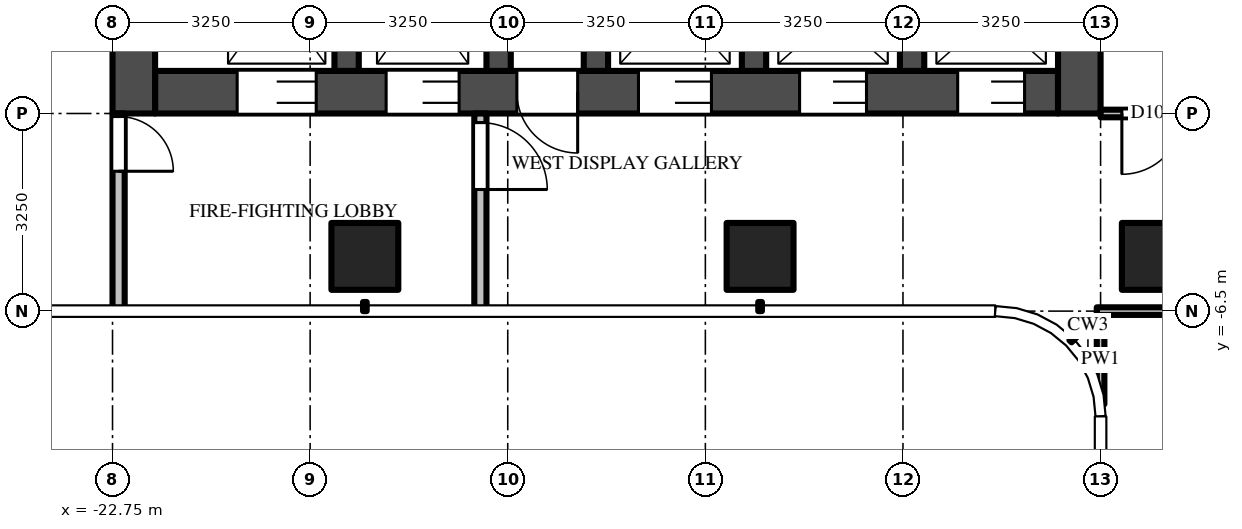
"""IFC4 building model, lengths in metres.
Left out: names, types, materials, properties, quantities, classifications, styles, units other than length and angle.
Written with IfcOpenShell. Run it as: python <this file> out.ifc"""

import sys

from ifc_helpers import new_model, si_unit, direction, frame, frame_2d, origin, origin_2d, place, context, subcontext, project, spatial, rectangle, extrude, source, transform, mapped, element, fill, save


model = new_model("IFC4")
c1 = context("Model", 3, precision=1e-05, world=origin(), true_north=direction((0.0, 1.0)))
c2 = subcontext(c1, "Body", "Model", "MODEL_VIEW")
j1 = project(units=[si_unit("LENGTHUNIT", "METRE"), si_unit("PLANEANGLEUNIT", "RADIAN")], contexts=[c1])
p1 = place(None, origin())
s1 = spatial("IfcSite", under=j1, at=p1, CompositionType="ELEMENT")
p2 = place(p1, origin())
s2 = spatial("IfcBuilding", under=s1, at=p2, CompositionType="ELEMENT")
p3 = place(p2, frame((0.0, 0.0, 232.4)))
s3 = spatial("IfcBuildingStorey", under=s2, at=p3, CompositionType="ELEMENT", Elevation=232.4)
m1 = source(origin(), c2, "Body", "SweptSolid", [
    extrude(rectangle(XDim=1.1, YDim=1.1, at=origin_2d()), origin(), (0.0, 0.0, 1.0), 3.9),
])
for number, where, z_axis, x_axis in (
    (1, (-5.6, -5.6, 0.0), (0.0, 0.0, 1.0), (1.0, 0.0, 0.0)),
    (2, (-12.1, -5.6, 0.0), (0.0, 0.0, 1.0), (1.0, 0.0, 0.0)),
    (3, (-18.6, -5.6, 0.0), (0.0, 0.0, 1.0), (1.0, 0.0, 0.0)),
):
    element("IfcColumn", number, at=place(p3, frame(where, z_axis=z_axis, x_axis=x_axis)), inside=s3, PredefinedType="COLUMN", context=c2, shape_type="MappedRepresentation", body=[
        mapped(m1, transform((0.0, 0.0, 0.0))),
    ])
m2 = source(origin(), c2, "Body", "SweptSolid", [
    extrude(rectangle(XDim=14.85, YDim=0.7, at=frame_2d((7.425, 0.0))), origin(), (0.0, 0.0, 1.0), 3.7),
])
p4 = place(p3, frame((-7.2, -2.9, 0.0), z_axis=(0.0, 0.0, 1.0), x_axis=(-1.0, 0.0, 0.0)))
e4 = element("IfcWall", 4, at=p4, inside=s3, PredefinedType="SHEAR", context=c2, shape_type="MappedRepresentation", body=[
    mapped(m2, transform((0.0, 0.0, 0.0))),
])
m3 = source(origin(), c2, "Body", "SweptSolid", [
    extrude(rectangle(XDim=1.1, YDim=2.1, at=frame_2d((0.55, 1.05))), frame((0.0, 0.36, 0.0), z_axis=(0.0, -1.0, 0.0), x_axis=(1.0, 0.0, 0.0)), (0.0, 0.0, 1.0), 0.72),
])
p5 = place(p4, frame((0.55, 0.0, 0.0)))
e5 = element("IfcOpeningElement", 5, at=p5, cuts=e4, PredefinedType="OPENING", context=c2, shape_type="MappedRepresentation", body=[
    mapped(m3, transform((0.0, 0.0, 0.0))),
])
p6 = place(p4, frame((3.15, 0.0, 0.0)))
e6 = element("IfcOpeningElement", 6, at=p6, cuts=e4, PredefinedType="OPENING", context=c2, shape_type="MappedRepresentation", body=[
    mapped(m3, transform((0.0, 0.0, 0.0))),
])
m4 = source(origin(), c2, "Body", "SweptSolid", [
    extrude(rectangle(XDim=1.2, YDim=2.1, at=frame_2d((0.6, 1.05))), frame((0.0, 0.36, 0.0), z_axis=(0.0, -1.0, 0.0), x_axis=(1.0, 0.0, 0.0)), (0.0, 0.0, 1.0), 0.72),
])
p7 = place(p4, frame((5.7, 0.0, 0.0)))
e7 = element("IfcOpeningElement", 7, at=p7, cuts=e4, PredefinedType="OPENING", context=c2, shape_type="MappedRepresentation", body=[
    mapped(m4, transform((0.0, 0.0, 0.0))),
])
m5 = source(origin(), c2, "Body", "SweptSolid", [
    extrude(rectangle(XDim=1.3, YDim=2.1, at=frame_2d((0.65, 1.05))), frame((0.0, 0.36, 0.0), z_axis=(0.0, -1.0, 0.0), x_axis=(1.0, 0.0, 0.0)), (0.0, 0.0, 1.0), 0.72),
])
p8 = place(p4, frame((12.2, 0.0, 0.0)))
e8 = element("IfcOpeningElement", 8, at=p8, cuts=e4, PredefinedType="OPENING", context=c2, shape_type="MappedRepresentation", body=[
    mapped(m5, transform((0.0, 0.0, 0.0))),
])
p9 = place(p4, frame((9.85, 0.0, 0.0)))
e9 = element("IfcOpeningElement", 9, at=p9, cuts=e4, PredefinedType="OPENING", context=c2, shape_type="MappedRepresentation", body=[
    mapped(m4, transform((0.0, 0.0, 0.0))),
])
m6 = source(origin(), c2, "Body", "SweptSolid", [
    extrude(rectangle(XDim=1.0, YDim=2.1, at=frame_2d((0.5, 1.05))), frame((0.0, 0.36, 0.0), z_axis=(0.0, -1.0, 0.0), x_axis=(1.0, 0.0, 0.0)), (0.0, 0.0, 1.0), 0.72),
])
p10 = place(p4, frame((7.9, 0.0, 0.0)))
e10 = element("IfcOpeningElement", 10, at=p10, cuts=e4, PredefinedType="OPENING", context=c2, shape_type="MappedRepresentation", body=[
    mapped(m6, transform((0.0, 0.0, 0.0))),
])
m7 = source(origin(), c2, "Body", "SweptSolid", [
    extrude(rectangle(XDim=9.05, YDim=0.7, at=frame_2d((4.525, 0.0))), origin(), (0.0, 0.0, 1.0), 3.7),
])
p11 = place(p3, frame((-6.85, 5.8, 0.0), z_axis=(0.0, 0.0, 1.0), x_axis=(0.0, -1.0, 0.0)))
e11 = element("IfcWall", 11, at=p11, inside=s3, PredefinedType="SHEAR", context=c2, shape_type="MappedRepresentation", body=[
    mapped(m7, transform((0.0, 0.0, 0.0))),
])
m8 = source(origin(), c2, "Body", "SweptSolid", [
    extrude(rectangle(XDim=1.8, YDim=2.1, at=frame_2d((0.9, 1.05))), frame((0.0, 0.36, 0.0), z_axis=(0.0, -1.0, 0.0), x_axis=(1.0, 0.0, 0.0)), (0.0, 0.0, 1.0), 0.72),
])
p12 = place(p11, frame((3.15, 0.0, 0.0)))
e12 = element("IfcOpeningElement", 12, at=p12, cuts=e11, PredefinedType="OPENING", context=c2, shape_type="MappedRepresentation", body=[
    mapped(m8, transform((0.0, 0.0, 0.0))),
])
p13 = place(p3, frame((-22.4, 5.8, 0.0), z_axis=(0.0, 0.0, 1.0), x_axis=(0.0, -1.0, 0.0)))
e13 = element("IfcWall", 13, at=p13, inside=s3, PredefinedType="SHEAR", context=c2, shape_type="MappedRepresentation", body=[
    mapped(m7, transform((0.0, 0.0, 0.0))),
])
m9 = source(origin(), c2, "Body", "SweptSolid", [
    extrude(rectangle(XDim=2.45, YDim=0.4, at=frame_2d((1.225, 0.0))), origin(), (0.0, 0.0, 1.0), 3.7),
])
for number, where, z_axis, x_axis in (
    (14, (-9.6, -0.1, 0.0), (0.0, 0.0, 1.0), (0.0, -1.0, 0.0)),
    (15, (-12.2, -0.1, 0.0), (0.0, 0.0, 1.0), (0.0, -1.0, 0.0)),
    (16, (-14.8, -0.1, 0.0), (0.0, 0.0, 1.0), (0.0, -1.0, 0.0)),
    (17, (-16.4, -0.1, 0.0), (0.0, 0.0, 1.0), (0.0, -1.0, 0.0)),
    (18, (-18.9, -0.1, 0.0), (0.0, 0.0, 1.0), (0.0, -1.0, 0.0)),
):
    element("IfcWall", number, at=place(p3, frame(where, z_axis=z_axis, x_axis=x_axis)), inside=s3, PredefinedType="SHEAR", context=c2, shape_type="MappedRepresentation", body=[
        mapped(m9, transform((0.0, 0.0, 0.0))),
    ])
m10 = source(origin(), c2, "Body", "SweptSolid", [
    extrude(rectangle(XDim=3.25, YDim=0.2, at=frame_2d((1.625, 0.0))), origin(), (0.0, 0.0, 1.0), 3.7),
])
p14 = place(p3, frame((-16.7, -3.25, 0.0), z_axis=(0.0, 0.0, 1.0), x_axis=(0.0, -1.0, 0.0)))
e19 = element("IfcWall", 19, at=p14, inside=s3, PredefinedType="PARTITIONING", context=c2, shape_type="MappedRepresentation", body=[
    mapped(m10, transform((0.0, 0.0, 0.0))),
])
m11 = source(origin(), c2, "Body", "SweptSolid", [
    extrude(rectangle(XDim=1.1, YDim=2.1, at=frame_2d((0.55, 1.05))), frame((0.0, 0.11, 0.0), z_axis=(0.0, -1.0, 0.0), x_axis=(1.0, 0.0, 0.0)), (0.0, 0.0, 1.0), 0.22),
])
p15 = place(p14, frame((0.15, 0.0, 0.0)))
e20 = element("IfcOpeningElement", 20, at=p15, cuts=e19, PredefinedType="OPENING", context=c2, shape_type="MappedRepresentation", body=[
    mapped(m11, transform((0.0, 0.0, 0.0))),
])
p16 = place(p3, frame((-22.65, -3.25, 0.0), z_axis=(0.0, 0.0, 1.0), x_axis=(0.0, -1.0, 0.0)))
e21 = element("IfcWall", 21, at=p16, inside=s3, PredefinedType="PARTITIONING", context=c2, shape_type="MappedRepresentation", body=[
    mapped(m10, transform((0.0, 0.0, 0.0))),
])
m12 = source(origin(), c2, "Body", "SweptSolid", [
    extrude(rectangle(XDim=0.9, YDim=2.1, at=frame_2d((0.45, 1.05))), frame((0.0, 0.11, 0.0), z_axis=(0.0, -1.0, 0.0), x_axis=(1.0, 0.0, 0.0)), (0.0, 0.0, 1.0), 0.22),
])
p17 = place(p16, frame((0.05, 0.0, 0.0)))
e22 = element("IfcOpeningElement", 22, at=p17, cuts=e21, PredefinedType="OPENING", context=c2, shape_type="MappedRepresentation", body=[
    mapped(m12, transform((0.0, 0.0, 0.0))),
])
m13 = source(origin(), c2, "Body", "SweptSolid", [
    extrude(rectangle(XDim=1.469, YDim=0.125, at=frame_2d((0.734, 0.0))), origin(), (0.0, 0.0, 1.0), 3.7),
])
p18 = place(p3, frame((-6.5, -6.562, 0.0), z_axis=(0.0, 0.0, 1.0), x_axis=(0.0, -1.0, 0.0)))
e23 = element("IfcWall", 23, at=p18, inside=s3, PredefinedType="PARTITIONING", context=c2, shape_type="MappedRepresentation", body=[
    mapped(m13, transform((0.0, 0.0, 0.0))),
])
m14 = source(origin(), c2, "Body", "SweptSolid", [
    extrude(rectangle(XDim=3.725, YDim=0.125, at=frame_2d((1.863, 0.0))), origin(), (0.0, 0.0, 1.0), 2.78),
])
p19 = place(p3, frame((-2.837, -6.5, 0.0), z_axis=(0.0, 0.0, 1.0), x_axis=(-1.0, 0.0, 0.0)))
e24 = element("IfcWall", 24, at=p19, inside=s3, PredefinedType="PARTITIONING", context=c2, shape_type="MappedRepresentation", body=[
    mapped(m14, transform((0.0, 0.0, 0.0))),
])
m15 = source(origin(), c2, "Body", "SweptSolid", [
    extrude(rectangle(XDim=5.363, YDim=0.125, at=frame_2d((2.681, 0.0))), origin(), (0.0, 0.0, 1.0), 2.997),
])
p20 = place(p3, frame((-1.137, -3.25, 0.0), z_axis=(0.0, 0.0, 1.0), x_axis=(-1.0, 0.0, 0.0)))
e25 = element("IfcWall", 25, at=p20, inside=s3, PredefinedType="PARTITIONING", context=c2, shape_type="MappedRepresentation", body=[
    mapped(m15, transform((0.0, 0.0, 0.0))),
])
m16 = source(origin(), c2, "Body", "SweptSolid", [
    extrude(rectangle(XDim=1.0, YDim=2.1, at=frame_2d((0.5, 1.05))), frame((0.0, 0.073, 0.0), z_axis=(0.0, -1.0, 0.0), x_axis=(1.0, 0.0, 0.0)), (0.0, 0.0, 1.0), 0.145),
])
p21 = place(p20, frame((4.012, 0.0, 0.0)))
e26 = element("IfcOpeningElement", 26, at=p21, cuts=e25, PredefinedType="OPENING", context=c2, shape_type="MappedRepresentation", body=[
    mapped(m16, transform((0.0, 0.0, 0.0))),
])
m17 = source(origin(), c2, "Body", "SweptSolid", [
    extrude(rectangle(XDim=1.1, YDim=2.1, at=frame_2d((0.55, 1.05))), frame((0.0, -0.275, 0.0), z_axis=(0.0, -1.0, 0.0), x_axis=(1.0, 0.0, 0.0)), (0.0, 0.0, 1.0), 0.05),
])
p22 = place(p5, origin())
e27 = element("IfcDoor", 27, at=p22, inside=s3, OperationType="DOUBLE_DOOR_SLIDING", PredefinedType="DOOR", context=c2, shape_type="MappedRepresentation", body=[
    mapped(m17, transform((0.0, 0.0, 0.0))),
])
fill(e5, e27)
p23 = place(p6, origin())
e28 = element("IfcDoor", 28, at=p23, inside=s3, OperationType="DOUBLE_DOOR_SLIDING", PredefinedType="DOOR", context=c2, shape_type="MappedRepresentation", body=[
    mapped(m17, transform((0.0, 0.0, 0.0))),
])
fill(e6, e28)
m18 = source(origin(), c2, "Body", "SweptSolid", [
    extrude(rectangle(XDim=1.2, YDim=2.1, at=frame_2d((0.6, 1.05))), frame((0.0, -0.275, 0.0), z_axis=(0.0, -1.0, 0.0), x_axis=(1.0, 0.0, 0.0)), (0.0, 0.0, 1.0), 0.05),
])
p24 = place(p7, origin())
e29 = element("IfcDoor", 29, at=p24, inside=s3, OperationType="DOUBLE_DOOR_SLIDING", PredefinedType="DOOR", context=c2, shape_type="MappedRepresentation", body=[
    mapped(m18, transform((0.0, 0.0, 0.0))),
])
fill(e7, e29)
m19 = source(origin(), c2, "Body", "SweptSolid", [
    extrude(rectangle(XDim=1.3, YDim=2.1, at=frame_2d((0.65, 1.05))), frame((0.0, -0.275, 0.0), z_axis=(0.0, -1.0, 0.0), x_axis=(1.0, 0.0, 0.0)), (0.0, 0.0, 1.0), 0.05),
])
p25 = place(p8, origin())
e30 = element("IfcDoor", 30, at=p25, inside=s3, OperationType="DOUBLE_DOOR_SLIDING", PredefinedType="DOOR", context=c2, shape_type="MappedRepresentation", body=[
    mapped(m19, transform((0.0, 0.0, 0.0))),
])
fill(e8, e30)
p26 = place(p9, origin())
e31 = element("IfcDoor", 31, at=p26, inside=s3, OperationType="DOUBLE_DOOR_SLIDING", PredefinedType="DOOR", context=c2, shape_type="MappedRepresentation", body=[
    mapped(m18, transform((0.0, 0.0, 0.0))),
])
fill(e9, e31)
m20 = source(origin(), c2, "Body", "SweptSolid", [
    extrude(rectangle(XDim=1.0, YDim=2.1, at=frame_2d((0.5, 1.05))), frame((0.0, -0.275, 0.0), z_axis=(0.0, -1.0, 0.0), x_axis=(1.0, 0.0, 0.0)), (0.0, 0.0, 1.0), 0.05),
])
p27 = place(p10, origin())
e32 = element("IfcDoor", 32, at=p27, inside=s3, OperationType="SINGLE_SWING_LEFT", PredefinedType="DOOR", context=c2, shape_type="MappedRepresentation", body=[
    mapped(m20, transform((0.0, 0.0, 0.0))),
])
fill(e10, e32)
m21 = source(origin(), c2, "Body", "SweptSolid", [
    extrude(rectangle(XDim=1.1, YDim=2.1, at=frame_2d((0.55, 1.05))), frame((0.0, 0.025, 0.0), z_axis=(0.0, -1.0, 0.0), x_axis=(1.0, 0.0, 0.0)), (0.0, 0.0, 1.0), 0.05),
])
p28 = place(p15, origin())
e33 = element("IfcDoor", 33, at=p28, inside=s3, OperationType="SINGLE_SWING_RIGHT", PredefinedType="DOOR", context=c2, shape_type="MappedRepresentation", body=[
    mapped(m21, transform((0.0, 0.0, 0.0))),
])
fill(e20, e33)
m22 = source(origin(), c2, "Body", "SweptSolid", [
    extrude(rectangle(XDim=0.9, YDim=2.1, at=frame_2d((0.45, 1.05))), frame((0.0, 0.025, 0.0), z_axis=(0.0, -1.0, 0.0), x_axis=(1.0, 0.0, 0.0)), (0.0, 0.0, 1.0), 0.05),
])
p29 = place(p17, origin())
e34 = element("IfcDoor", 34, at=p29, inside=s3, OperationType="SINGLE_SWING_RIGHT", PredefinedType="DOOR", context=c2, shape_type="MappedRepresentation", body=[
    mapped(m22, transform((0.0, 0.0, 0.0))),
])
fill(e22, e34)
m23 = source(origin(), c2, "Body", "SweptSolid", [
    extrude(rectangle(XDim=1.0, YDim=2.1, at=frame_2d((0.5, 1.05))), frame((0.0, 0.025, 0.0), z_axis=(0.0, -1.0, 0.0), x_axis=(1.0, 0.0, 0.0)), (0.0, 0.0, 1.0), 0.05),
])
p30 = place(p21, origin())
e35 = element("IfcDoor", 35, at=p30, inside=s3, OperationType="SINGLE_SWING_RIGHT", PredefinedType="DOOR", context=c2, shape_type="MappedRepresentation", body=[
    mapped(m23, transform((0.0, 0.0, 0.0))),
])
fill(e26, e35)
save(model, sys.argv[1])
